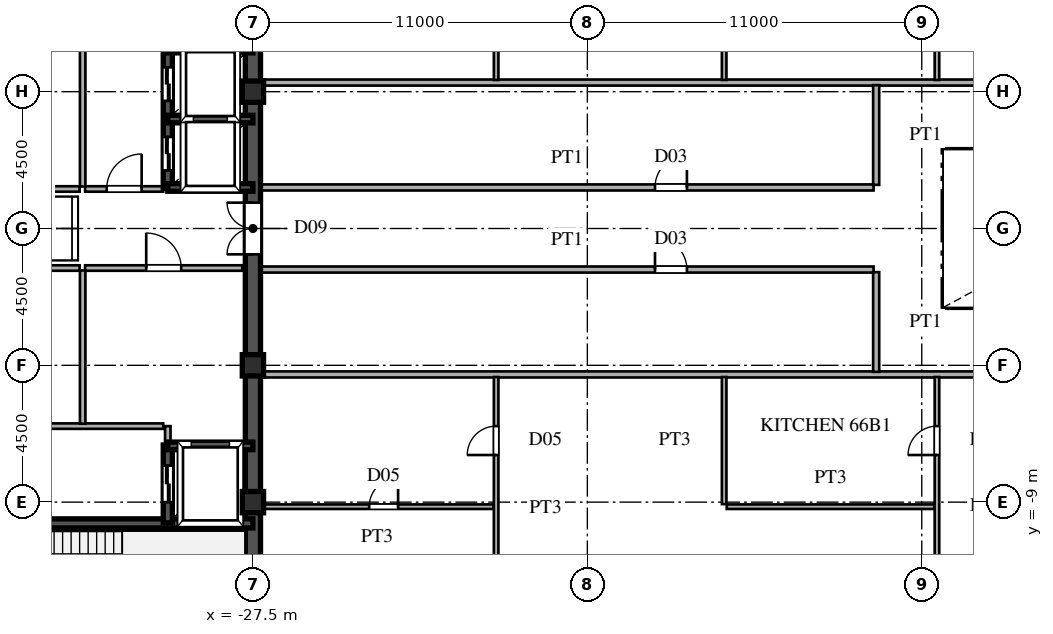
"""IFC4 building model, lengths in metres.
Left out: names, types, materials, properties, quantities, classifications, styles, units other than length and angle.
Written with IfcOpenShell. Run it as: python <this file> out.ifc"""

import sys

from ifc_helpers import new_model, si_unit, direction, frame, frame_2d, origin, origin_2d, place, context, subcontext, project, spatial, rectangle, hollow_rectangle, extrude, source, transform, mapped, element, fill, save


model = new_model("IFC4")
c1 = context("Model", 3, precision=1e-05, world=origin(), true_north=direction((0.0, 1.0)))
c2 = subcontext(c1, "Body", "Model", "MODEL_VIEW")
j1 = project(units=[si_unit("LENGTHUNIT", "METRE"), si_unit("PLANEANGLEUNIT", "RADIAN")], contexts=[c1])
p1 = place(None, origin())
s1 = spatial("IfcSite", under=j1, at=p1, CompositionType="ELEMENT")
p2 = place(p1, origin())
s2 = spatial("IfcBuilding", under=s1, at=p2, CompositionType="ELEMENT")
p3 = place(p2, frame((0.0, 0.0, 250.65)))
s3 = spatial("IfcBuildingStorey", under=s2, at=p3, CompositionType="ELEMENT", Elevation=250.65)
m1 = source(origin(), c2, "Body", "SweptSolid", [
    extrude(hollow_rectangle(XDim=0.7, YDim=0.7, WallThickness=0.03, at=origin_2d()), origin(), (0.0, 0.0, 1.0), 3.75),
])
for number, where, z_axis, x_axis in (
    (1, (-27.5, -9.0, 0.0), (0.0, 0.0, 1.0), (1.0, 0.0, 0.0)),
    (2, (-27.5, -4.5, 0.0), (0.0, 0.0, 1.0), (1.0, 0.0, 0.0)),
    (3, (-27.5, 4.5, 0.0), (0.0, 0.0, 1.0), (1.0, 0.0, 0.0)),
):
    element("IfcColumn", number, at=place(p3, frame(where, z_axis=z_axis, x_axis=x_axis)), inside=s3, PredefinedType="COLUMN", context=c2, shape_type="MappedRepresentation", body=[
        mapped(m1, transform((0.0, 0.0, 0.0), scale=1.0)),
    ])
for number, where, z_axis, x_axis in (
    (4, (-27.5, -13.5, 0.0), (0.0, 0.0, 1.0), (0.0, 1.0, 0.0)),
    (5, (-27.5, 1.3, 0.0), (0.0, 0.0, 1.0), (0.0, 1.0, 0.0)),
):
    element("IfcWall", number, at=place(p3, frame(where, z_axis=z_axis, x_axis=x_axis)), inside=s3, PredefinedType="SHEAR", context=c2, shape_type="SweptSolid", body=[
        extrude(rectangle(XDim=12.2, YDim=0.5, at=frame_2d((6.1, 0.0))), origin(), (0.0, 0.0, 1.0), 3.53),
    ])
p4 = place(p3, frame((-27.5, -1.3, 0.0), z_axis=(0.0, 0.0, 1.0), x_axis=(0.0, 1.0, 0.0)))
e6 = element("IfcWall", 6, at=p4, inside=s3, PredefinedType="SHEAR", context=c2, shape_type="SweptSolid", body=[
    extrude(rectangle(XDim=2.6, YDim=0.5, at=frame_2d((1.3, 0.0))), origin(), (0.0, 0.0, 1.0), 3.53),
])
p5 = place(p4, frame((0.45, 0.0, 0.0)))
e7 = element("IfcOpeningElement", 7, at=p5, cuts=e6, PredefinedType="OPENING", context=c2, shape_type="SweptSolid", body=[
    extrude(rectangle(XDim=1.7, YDim=2.35, at=frame_2d((0.85, 1.175))), frame((0.0, 0.26, 0.0), z_axis=(0.0, -1.0, 0.0), x_axis=(1.0, 0.0, 0.0)), (0.0, 0.0, 1.0), 0.52),
])
p6 = place(p3, frame((-36.5, -9.7, 0.0), z_axis=(0.0, 0.0, 1.0), x_axis=(1.0, 0.0, 0.0)))
e8 = element("IfcWall", 8, at=p6, inside=s3, PredefinedType="SHEAR", context=c2, shape_type="SweptSolid", body=[
    extrude(rectangle(XDim=9.0, YDim=0.3, at=frame_2d((4.5, 0.0))), origin(), (0.0, 0.0, 1.0), 3.53),
])
p7 = place(p6, frame((0.6, 0.0, 0.0)))
e9 = element("IfcOpeningElement", 9, at=p7, cuts=e8, PredefinedType="OPENING", context=c2, shape_type="SweptSolid", body=[
    extrude(rectangle(XDim=1.1, YDim=2.2, at=frame_2d((0.55, 1.1))), frame((0.0, 0.16, 0.0), z_axis=(0.0, -1.0, 0.0), x_axis=(1.0, 0.0, 0.0)), (0.0, 0.0, 1.0), 0.32),
])
for number, where, z_axis, x_axis in (
    (10, (-30.3, -7.15, 0.0), (0.0, 0.0, 1.0), (1.0, 0.0, 0.0)),
    (11, (-30.3, 1.35, 0.0), (0.0, 0.0, 1.0), (1.0, 0.0, 0.0)),
    (12, (-30.3, 3.6, 0.0), (0.0, 0.0, 1.0), (1.0, 0.0, 0.0)),
    (13, (-30.3, 5.9, 0.0), (0.0, 0.0, 1.0), (1.0, 0.0, 0.0)),
):
    element("IfcWall", number, at=place(p3, frame(where, z_axis=z_axis, x_axis=x_axis)), inside=s3, PredefinedType="SHEAR", context=c2, shape_type="SweptSolid", body=[
        extrude(rectangle(XDim=2.8, YDim=0.25, at=frame_2d((1.4, 0.0))), origin(), (0.0, 0.0, 1.0), 3.53),
    ])
p8 = place(p3, frame((-30.3, -9.68, 0.0), z_axis=(0.0, 0.0, 1.0), x_axis=(0.0, 1.0, 0.0)))
e14 = element("IfcWall", 14, at=p8, inside=s3, PredefinedType="SHEAR", context=c2, shape_type="SweptSolid", body=[
    extrude(rectangle(XDim=2.56, YDim=0.3, at=frame_2d((1.28, 0.0))), origin(), (0.0, 0.0, 1.0), 3.53),
])
p9 = place(p8, frame((0.68, 0.0, 0.0)))
e15 = element("IfcOpeningElement", 15, at=p9, cuts=e14, PredefinedType="OPENING", context=c2, shape_type="SweptSolid", body=[
    extrude(rectangle(XDim=1.2, YDim=2.25, at=frame_2d((0.6, 1.125))), frame((0.0, 0.16, 0.0), z_axis=(0.0, -1.0, 0.0), x_axis=(1.0, 0.0, 0.0)), (0.0, 0.0, 1.0), 0.32),
])
p10 = place(p3, frame((-30.3, 1.32, 0.0), z_axis=(0.0, 0.0, 1.0), x_axis=(0.0, 1.0, 0.0)))
e16 = element("IfcWall", 16, at=p10, inside=s3, PredefinedType="SHEAR", context=c2, shape_type="SweptSolid", body=[
    extrude(rectangle(XDim=2.28, YDim=0.3, at=frame_2d((1.14, 0.0))), origin(), (0.0, 0.0, 1.0), 3.53),
])
p11 = place(p10, frame((0.59, 0.0, 0.0)))
e17 = element("IfcOpeningElement", 17, at=p11, cuts=e16, PredefinedType="OPENING", context=c2, shape_type="SweptSolid", body=[
    extrude(rectangle(XDim=1.1, YDim=2.2, at=frame_2d((0.55, 1.1))), frame((0.0, 0.16, 0.0), z_axis=(0.0, -1.0, 0.0), x_axis=(1.0, 0.0, 0.0)), (0.0, 0.0, 1.0), 0.32),
])
p12 = place(p3, frame((-30.3, 3.6, 0.0), z_axis=(0.0, 0.0, 1.0), x_axis=(0.0, 1.0, 0.0)))
e18 = element("IfcWall", 18, at=p12, inside=s3, PredefinedType="SHEAR", context=c2, shape_type="SweptSolid", body=[
    extrude(rectangle(XDim=2.3, YDim=0.3, at=frame_2d((1.15, 0.0))), origin(), (0.0, 0.0, 1.0), 3.53),
])
p13 = place(p12, frame((0.6, 0.0, 0.0)))
e19 = element("IfcOpeningElement", 19, at=p13, cuts=e18, PredefinedType="OPENING", context=c2, shape_type="SweptSolid", body=[
    extrude(rectangle(XDim=1.1, YDim=2.2, at=frame_2d((0.55, 1.1))), frame((0.0, 0.16, 0.0), z_axis=(0.0, -1.0, 0.0), x_axis=(1.0, 0.0, 0.0)), (0.0, 0.0, 1.0), 0.32),
])
p14 = place(p3, frame((-36.15, -6.5, 0.0), z_axis=(0.0, 0.0, 1.0), x_axis=(1.0, 0.0, 0.0)))
e20 = element("IfcWall", 20, at=p14, inside=s3, PredefinedType="PARTITIONING", context=c2, shape_type="SweptSolid", body=[
    extrude(rectangle(XDim=5.7, YDim=0.18, at=frame_2d((2.85, 0.0))), origin(), (0.0, 0.0, 1.0), 3.53),
])
p15 = place(p3, frame((-30.3, -7.12, 0.0), z_axis=(0.0, 0.0, 1.0), x_axis=(0.0, 1.0, 0.0)))
e21 = element("IfcWall", 21, at=p15, inside=s3, PredefinedType="PARTITIONING", context=c2, shape_type="SweptSolid", body=[
    extrude(rectangle(XDim=0.62, YDim=0.18, at=frame_2d((0.31, 0.0))), origin(), (0.0, 0.0, 1.0), 3.53),
])
p16 = place(p3, frame((-33.1, -6.42, 0.0), z_axis=(0.0, 0.0, 1.0), x_axis=(0.0, 1.0, 0.0)))
e22 = element("IfcWall", 22, at=p16, inside=s3, PredefinedType="PARTITIONING", context=c2, shape_type="SweptSolid", body=[
    extrude(rectangle(XDim=5.04, YDim=0.18, at=frame_2d((2.52, 0.0))), origin(), (0.0, 0.0, 1.0), 3.53),
])
p17 = place(p3, frame((-33.1, 1.38, 0.0), z_axis=(0.0, 0.0, 1.0), x_axis=(0.0, 1.0, 0.0)))
e23 = element("IfcWall", 23, at=p17, inside=s3, PredefinedType="PARTITIONING", context=c2, shape_type="SweptSolid", body=[
    extrude(rectangle(XDim=6.74, YDim=0.18, at=frame_2d((3.37, 0.0))), origin(), (0.0, 0.0, 1.0), 3.53),
])
p18 = place(p3, frame((-33.02, -1.3, 0.0), z_axis=(0.0, 0.0, 1.0), x_axis=(1.0, 0.0, 0.0)))
e24 = element("IfcWall", 24, at=p18, inside=s3, PredefinedType="PARTITIONING", context=c2, shape_type="SweptSolid", body=[
    extrude(rectangle(XDim=5.17, YDim=0.18, at=frame_2d((2.585, 0.0))), origin(), (0.0, 0.0, 1.0), 3.53),
])
p19 = place(p18, frame((2.01, 0.0, 0.0)))
e25 = element("IfcOpeningElement", 25, at=p19, cuts=e24, PredefinedType="OPENING", context=c2, shape_type="SweptSolid", body=[
    extrude(rectangle(XDim=1.15, YDim=2.2, at=frame_2d((0.575, 1.1))), frame((0.0, 0.1, 0.0), z_axis=(0.0, -1.0, 0.0), x_axis=(1.0, 0.0, 0.0)), (0.0, 0.0, 1.0), 0.2),
])
p20 = place(p3, frame((-33.02, 1.3, 0.0), z_axis=(0.0, 0.0, 1.0), x_axis=(1.0, 0.0, 0.0)))
e26 = element("IfcWall", 26, at=p20, inside=s3, PredefinedType="PARTITIONING", context=c2, shape_type="SweptSolid", body=[
    extrude(rectangle(XDim=2.57, YDim=0.18, at=frame_2d((1.285, 0.0))), origin(), (0.0, 0.0, 1.0), 3.53),
])
p21 = place(p20, frame((0.71, 0.0, 0.0)))
e27 = element("IfcOpeningElement", 27, at=p21, cuts=e26, PredefinedType="OPENING", context=c2, shape_type="SweptSolid", body=[
    extrude(rectangle(XDim=1.15, YDim=2.2, at=frame_2d((0.575, 1.1))), frame((0.0, 0.1, 0.0), z_axis=(0.0, -1.0, 0.0), x_axis=(1.0, 0.0, 0.0)), (0.0, 0.0, 1.0), 0.2),
])
for number, where, z_axis, x_axis in (
    (28, (-36.15, -1.3, 0.0), (0.0, 0.0, 1.0), (1.0, 0.0, 0.0)),
    (29, (-36.15, 1.3, 0.0), (0.0, 0.0, 1.0), (1.0, 0.0, 0.0)),
):
    element("IfcWall", number, at=place(p3, frame(where, z_axis=z_axis, x_axis=x_axis)), inside=s3, PredefinedType="PARTITIONING", context=c2, shape_type="SweptSolid", body=[
        extrude(rectangle(XDim=2.95, YDim=0.18, at=frame_2d((1.475, 0.0))), origin(), (0.0, 0.0, 1.0), 3.53),
    ])
p22 = place(p3, frame((-27.245, -9.15, 0.0), z_axis=(0.0, 0.0, 1.0), x_axis=(1.0, 0.0, 0.0)))
e30 = element("IfcWall", 30, at=p22, inside=s3, PredefinedType="PARTITIONING", context=c2, shape_type="SweptSolid", body=[
    extrude(rectangle(XDim=7.66, YDim=0.15, at=frame_2d((3.83, 0.0))), origin(), (0.0, 0.0, 1.0), 3.53),
])
p23 = place(p22, frame((3.57, 0.0, 0.0)))
e31 = element("IfcOpeningElement", 31, at=p23, cuts=e30, PredefinedType="OPENING", context=c2, shape_type="SweptSolid", body=[
    extrude(rectangle(XDim=0.95, YDim=2.15, at=frame_2d((0.475, 1.075))), frame((0.0, 0.085, 0.0), z_axis=(0.0, -1.0, 0.0), x_axis=(1.0, 0.0, 0.0)), (0.0, 0.0, 1.0), 0.17),
])
p24 = place(p3, frame((-11.915, -9.15, 0.0), z_axis=(0.0, 0.0, 1.0), x_axis=(1.0, 0.0, 0.0)))
e32 = element("IfcWall", 32, at=p24, inside=s3, PredefinedType="PARTITIONING", context=c2, shape_type="SweptSolid", body=[
    extrude(rectangle(XDim=6.83, YDim=0.15, at=frame_2d((3.415, 0.0))), origin(), (0.0, 0.0, 1.0), 3.53),
])
p25 = place(p3, frame((-27.245, -4.8, 0.0), z_axis=(0.0, 0.0, 1.0), x_axis=(1.0, 0.0, 0.0)))
e33 = element("IfcWall", 33, at=p25, inside=s3, PredefinedType="PARTITIONING", context=c2, shape_type="SweptSolid", body=[
    extrude(rectangle(XDim=54.49, YDim=0.2, at=frame_2d((27.245, 0.0))), origin(), (0.0, 0.0, 1.0), 3.53),
])
p26 = place(p25, frame((24.97, 0.0, 0.0)))
e34 = element("IfcOpeningElement", 34, at=p26, cuts=e33, PredefinedType="OPENING", context=c2, shape_type="SweptSolid", body=[
    extrude(rectangle(XDim=1.05, YDim=2.25, at=frame_2d((0.525, 1.125))), frame((0.0, 0.11, 0.0), z_axis=(0.0, -1.0, 0.0), x_axis=(1.0, 0.0, 0.0)), (0.0, 0.0, 1.0), 0.22),
])
p27 = place(p3, frame((-27.245, -1.35, 0.0), z_axis=(0.0, 0.0, 1.0), x_axis=(1.0, 0.0, 0.0)))
e35 = element("IfcWall", 35, at=p27, inside=s3, PredefinedType="PARTITIONING", context=c2, shape_type="SweptSolid", body=[
    extrude(rectangle(XDim=20.16, YDim=0.2, at=frame_2d((10.08, 0.0))), origin(), (0.0, 0.0, 1.0), 3.53),
])
p28 = place(p27, frame((12.97, 0.0, 0.0)))
e36 = element("IfcOpeningElement", 36, at=p28, cuts=e35, PredefinedType="OPENING", context=c2, shape_type="SweptSolid", body=[
    extrude(rectangle(XDim=1.05, YDim=2.25, at=frame_2d((0.525, 1.125))), frame((0.0, 0.11, 0.0), z_axis=(0.0, -1.0, 0.0), x_axis=(1.0, 0.0, 0.0)), (0.0, 0.0, 1.0), 0.22),
])
p29 = place(p3, frame((-27.245, 1.35, 0.0), z_axis=(0.0, 0.0, 1.0), x_axis=(1.0, 0.0, 0.0)))
e37 = element("IfcWall", 37, at=p29, inside=s3, PredefinedType="PARTITIONING", context=c2, shape_type="SweptSolid", body=[
    extrude(rectangle(XDim=20.16, YDim=0.2, at=frame_2d((10.08, 0.0))), origin(), (0.0, 0.0, 1.0), 3.53),
])
p30 = place(p29, frame((12.97, 0.0, 0.0)))
e38 = element("IfcOpeningElement", 38, at=p30, cuts=e37, PredefinedType="OPENING", context=c2, shape_type="SweptSolid", body=[
    extrude(rectangle(XDim=1.05, YDim=2.25, at=frame_2d((0.525, 1.125))), frame((0.0, 0.11, 0.0), z_axis=(0.0, -1.0, 0.0), x_axis=(1.0, 0.0, 0.0)), (0.0, 0.0, 1.0), 0.22),
])
p31 = place(p3, frame((-27.245, 4.8, 0.0), z_axis=(0.0, 0.0, 1.0), x_axis=(1.0, 0.0, 0.0)))
e39 = element("IfcWall", 39, at=p31, inside=s3, PredefinedType="PARTITIONING", context=c2, shape_type="SweptSolid", body=[
    extrude(rectangle(XDim=54.49, YDim=0.2, at=frame_2d((27.245, 0.0))), origin(), (0.0, 0.0, 1.0), 3.53),
])
p32 = place(p31, frame((24.97, 0.0, 0.0)))
e40 = element("IfcOpeningElement", 40, at=p32, cuts=e39, PredefinedType="OPENING", context=c2, shape_type="SweptSolid", body=[
    extrude(rectangle(XDim=1.05, YDim=2.25, at=frame_2d((0.525, 1.125))), frame((0.0, 0.11, 0.0), z_axis=(0.0, -1.0, 0.0), x_axis=(1.0, 0.0, 0.0)), (0.0, 0.0, 1.0), 0.22),
])
p33 = place(p3, frame((-19.5, -13.5, 0.0), z_axis=(0.0, 0.0, 1.0), x_axis=(0.0, 1.0, 0.0)))
e41 = element("IfcWall", 41, at=p33, inside=s3, PredefinedType="PARTITIONING", context=c2, shape_type="SweptSolid", body=[
    extrude(rectangle(XDim=8.615, YDim=0.15, at=frame_2d((4.308, 0.0))), origin(), (0.0, 0.0, 1.0), 3.53),
])
p34 = place(p33, frame((6.05, 0.0, 0.0)))
e42 = element("IfcOpeningElement", 42, at=p34, cuts=e41, PredefinedType="OPENING", context=c2, shape_type="SweptSolid", body=[
    extrude(rectangle(XDim=0.95, YDim=2.15, at=frame_2d((0.475, 1.075))), frame((0.0, 0.085, 0.0), z_axis=(0.0, -1.0, 0.0), x_axis=(1.0, 0.0, 0.0)), (0.0, 0.0, 1.0), 0.17),
])
p35 = place(p3, frame((-19.5, 4.885, 0.0), z_axis=(0.0, 0.0, 1.0), x_axis=(0.0, 1.0, 0.0)))
e43 = element("IfcWall", 43, at=p35, inside=s3, PredefinedType="PARTITIONING", context=c2, shape_type="SweptSolid", body=[
    extrude(rectangle(XDim=8.615, YDim=0.15, at=frame_2d((4.308, 0.0))), origin(), (0.0, 0.0, 1.0), 3.53),
])
p36 = place(p35, frame((1.615, 0.0, 0.0)))
e44 = element("IfcOpeningElement", 44, at=p36, cuts=e43, PredefinedType="OPENING", context=c2, shape_type="SweptSolid", body=[
    extrude(rectangle(XDim=0.95, YDim=2.15, at=frame_2d((0.475, 1.075))), frame((0.0, 0.085, 0.0), z_axis=(0.0, -1.0, 0.0), x_axis=(1.0, 0.0, 0.0)), (0.0, 0.0, 1.0), 0.17),
])
for number, where, z_axis, x_axis in (
    (45, (-12.0, -9.065, 0.0), (0.0, 0.0, 1.0), (0.0, 1.0, 0.0)),
    (46, (-12.0, 4.885, 0.0), (0.0, 0.0, 1.0), (0.0, 1.0, 0.0)),
):
    element("IfcWall", number, at=place(p3, frame(where, z_axis=z_axis, x_axis=x_axis)), inside=s3, PredefinedType="PARTITIONING", context=c2, shape_type="SweptSolid", body=[
        extrude(rectangle(XDim=4.18, YDim=0.15, at=frame_2d((2.09, 0.0))), origin(), (0.0, 0.0, 1.0), 3.53),
    ])
for number, where, z_axis, x_axis in (
    (47, (-7.0, -4.715, 0.0), (0.0, 0.0, 1.0), (0.0, 1.0, 0.0)),
    (48, (-7.0, 1.435, 0.0), (0.0, 0.0, 1.0), (0.0, 1.0, 0.0)),
):
    element("IfcWall", number, at=place(p3, frame(where, z_axis=z_axis, x_axis=x_axis)), inside=s3, PredefinedType="PARTITIONING", context=c2, shape_type="SweptSolid", body=[
        extrude(rectangle(XDim=3.28, YDim=0.2, at=frame_2d((1.64, 0.0))), origin(), (0.0, 0.0, 1.0), 3.53),
    ])
p37 = place(p3, frame((-5.0, -13.39, 0.0), z_axis=(0.0, 0.0, 1.0), x_axis=(0.0, 1.0, 0.0)))
e49 = element("IfcWall", 49, at=p37, inside=s3, PredefinedType="PARTITIONING", context=c2, shape_type="SweptSolid", body=[
    extrude(rectangle(XDim=8.505, YDim=0.15, at=frame_2d((4.252, 0.0))), origin(), (0.0, 0.0, 1.0), 3.53),
])
p38 = place(p37, frame((5.94, 0.0, 0.0)))
e50 = element("IfcOpeningElement", 50, at=p38, cuts=e49, PredefinedType="OPENING", context=c2, shape_type="SweptSolid", body=[
    extrude(rectangle(XDim=0.95, YDim=2.15, at=frame_2d((0.475, 1.075))), frame((0.0, 0.085, 0.0), z_axis=(0.0, -1.0, 0.0), x_axis=(1.0, 0.0, 0.0)), (0.0, 0.0, 1.0), 0.17),
])
p39 = place(p37, frame((1.59, 0.0, 0.0)))
e51 = element("IfcOpeningElement", 51, at=p39, cuts=e49, PredefinedType="OPENING", context=c2, shape_type="SweptSolid", body=[
    extrude(rectangle(XDim=0.95, YDim=2.15, at=frame_2d((0.475, 1.075))), frame((0.0, 0.085, 0.0), z_axis=(0.0, -1.0, 0.0), x_axis=(1.0, 0.0, 0.0)), (0.0, 0.0, 1.0), 0.17),
])
p40 = place(p3, frame((-5.0, 4.885, 0.0), z_axis=(0.0, 0.0, 1.0), x_axis=(0.0, 1.0, 0.0)))
e52 = element("IfcWall", 52, at=p40, inside=s3, PredefinedType="PARTITIONING", context=c2, shape_type="SweptSolid", body=[
    extrude(rectangle(XDim=8.505, YDim=0.15, at=frame_2d((4.252, 0.0))), origin(), (0.0, 0.0, 1.0), 3.53),
])
p41 = place(p40, frame((1.615, 0.0, 0.0)))
e53 = element("IfcOpeningElement", 53, at=p41, cuts=e52, PredefinedType="OPENING", context=c2, shape_type="SweptSolid", body=[
    extrude(rectangle(XDim=0.95, YDim=2.15, at=frame_2d((0.475, 1.075))), frame((0.0, 0.085, 0.0), z_axis=(0.0, -1.0, 0.0), x_axis=(1.0, 0.0, 0.0)), (0.0, 0.0, 1.0), 0.17),
])
p42 = place(p40, frame((5.965, 0.0, 0.0)))
e54 = element("IfcOpeningElement", 54, at=p42, cuts=e52, PredefinedType="OPENING", context=c2, shape_type="SweptSolid", body=[
    extrude(rectangle(XDim=0.95, YDim=2.15, at=frame_2d((0.475, 1.075))), frame((0.0, 0.085, 0.0), z_axis=(0.0, -1.0, 0.0), x_axis=(1.0, 0.0, 0.0)), (0.0, 0.0, 1.0), 0.17),
])
m2 = source(origin(), c2, "Body", "SweptSolid", [
    extrude(rectangle(XDim=1.7, YDim=2.35, at=frame_2d((0.85, 1.175))), frame((0.0, 0.025, 0.0), z_axis=(0.0, -1.0, 0.0), x_axis=(1.0, 0.0, 0.0)), (0.0, 0.0, 1.0), 0.05),
])
p43 = place(p5, origin())
e55 = element("IfcDoor", 55, at=p43, inside=s3, OperationType="DOUBLE_SWING_LEFT", PredefinedType="DOOR", context=c2, shape_type="MappedRepresentation", body=[
    mapped(m2, transform((0.0, 0.0, 0.0), scale=1.0)),
])
fill(e7, e55)
m3 = source(origin(), c2, "Body", "SweptSolid", [
    extrude(rectangle(XDim=1.2, YDim=2.25, at=frame_2d((0.6, 1.125))), frame((0.0, 0.025, 0.0), z_axis=(0.0, -1.0, 0.0), x_axis=(1.0, 0.0, 0.0)), (0.0, 0.0, 1.0), 0.05),
])
p44 = place(p9, origin())
e56 = element("IfcDoor", 56, at=p44, inside=s3, OperationType="DOUBLE_DOOR_SLIDING", PredefinedType="DOOR", context=c2, shape_type="MappedRepresentation", body=[
    mapped(m3, transform((0.0, 0.0, 0.0), scale=1.0)),
])
fill(e15, e56)
m4 = source(origin(), c2, "Body", "SweptSolid", [
    extrude(rectangle(XDim=1.1, YDim=2.2, at=frame_2d((0.55, 1.1))), frame((0.0, 0.025, 0.0), z_axis=(0.0, -1.0, 0.0), x_axis=(1.0, 0.0, 0.0)), (0.0, 0.0, 1.0), 0.05),
])
p45 = place(p11, origin())
e57 = element("IfcDoor", 57, at=p45, inside=s3, OperationType="DOUBLE_DOOR_SLIDING", PredefinedType="DOOR", context=c2, shape_type="MappedRepresentation", body=[
    mapped(m4, transform((0.0, 0.0, 0.0), scale=1.0)),
])
fill(e17, e57)
p46 = place(p13, origin())
e58 = element("IfcDoor", 58, at=p46, inside=s3, OperationType="DOUBLE_DOOR_SLIDING", PredefinedType="DOOR", context=c2, shape_type="MappedRepresentation", body=[
    mapped(m4, transform((0.0, 0.0, 0.0), scale=1.0)),
])
fill(e19, e58)
m5 = source(origin(), c2, "Body", "SweptSolid", [
    extrude(rectangle(XDim=1.15, YDim=2.2, at=frame_2d((0.575, 1.1))), frame((0.0, 0.025, 0.0), z_axis=(0.0, -1.0, 0.0), x_axis=(1.0, 0.0, 0.0)), (0.0, 0.0, 1.0), 0.05),
])
p47 = place(p19, origin())
e59 = element("IfcDoor", 59, at=p47, inside=s3, OperationType="SINGLE_SWING_LEFT", PredefinedType="DOOR", context=c2, shape_type="MappedRepresentation", body=[
    mapped(m5, transform((0.0, 0.0, 0.0), scale=1.0)),
])
fill(e25, e59)
p48 = place(p21, origin())
e60 = element("IfcDoor", 60, at=p48, inside=s3, OperationType="SINGLE_SWING_RIGHT", PredefinedType="DOOR", context=c2, shape_type="MappedRepresentation", body=[
    mapped(m5, transform((0.0, 0.0, 0.0), scale=1.0)),
])
fill(e27, e60)
m6 = source(origin(), c2, "Body", "SweptSolid", [
    extrude(rectangle(XDim=0.95, YDim=2.15, at=frame_2d((0.475, 1.075))), frame((0.0, 0.025, 0.0), z_axis=(0.0, -1.0, 0.0), x_axis=(1.0, 0.0, 0.0)), (0.0, 0.0, 1.0), 0.05),
])
p49 = place(p23, origin())
e61 = element("IfcDoor", 61, at=p49, inside=s3, OperationType="SINGLE_SWING_RIGHT", PredefinedType="DOOR", context=c2, shape_type="MappedRepresentation", body=[
    mapped(m6, transform((0.0, 0.0, 0.0), scale=1.0)),
])
fill(e31, e61)
m7 = source(origin(), c2, "Body", "SweptSolid", [
    extrude(rectangle(XDim=1.05, YDim=2.25, at=frame_2d((0.525, 1.125))), frame((0.0, 0.025, 0.0), z_axis=(0.0, -1.0, 0.0), x_axis=(1.0, 0.0, 0.0)), (0.0, 0.0, 1.0), 0.05),
])
p50 = place(p28, origin())
e62 = element("IfcDoor", 62, at=p50, inside=s3, OperationType="SINGLE_SWING_LEFT", PredefinedType="DOOR", context=c2, shape_type="MappedRepresentation", body=[
    mapped(m7, transform((0.0, 0.0, 0.0), scale=1.0)),
])
fill(e36, e62)
p51 = place(p30, origin())
e63 = element("IfcDoor", 63, at=p51, inside=s3, OperationType="SINGLE_SWING_RIGHT", PredefinedType="DOOR", context=c2, shape_type="MappedRepresentation", body=[
    mapped(m7, transform((0.0, 0.0, 0.0), scale=1.0)),
])
fill(e38, e63)
p52 = place(p34, origin())
e64 = element("IfcDoor", 64, at=p52, inside=s3, OperationType="SINGLE_SWING_LEFT", PredefinedType="DOOR", context=c2, shape_type="MappedRepresentation", body=[
    mapped(m6, transform((0.0, 0.0, 0.0), scale=1.0)),
])
fill(e42, e64)
p53 = place(p38, origin())
e65 = element("IfcDoor", 65, at=p53, inside=s3, OperationType="SINGLE_SWING_LEFT", PredefinedType="DOOR", context=c2, shape_type="MappedRepresentation", body=[
    mapped(m6, transform((0.0, 0.0, 0.0), scale=1.0)),
])
fill(e50, e65)
save(model, sys.argv[1])
